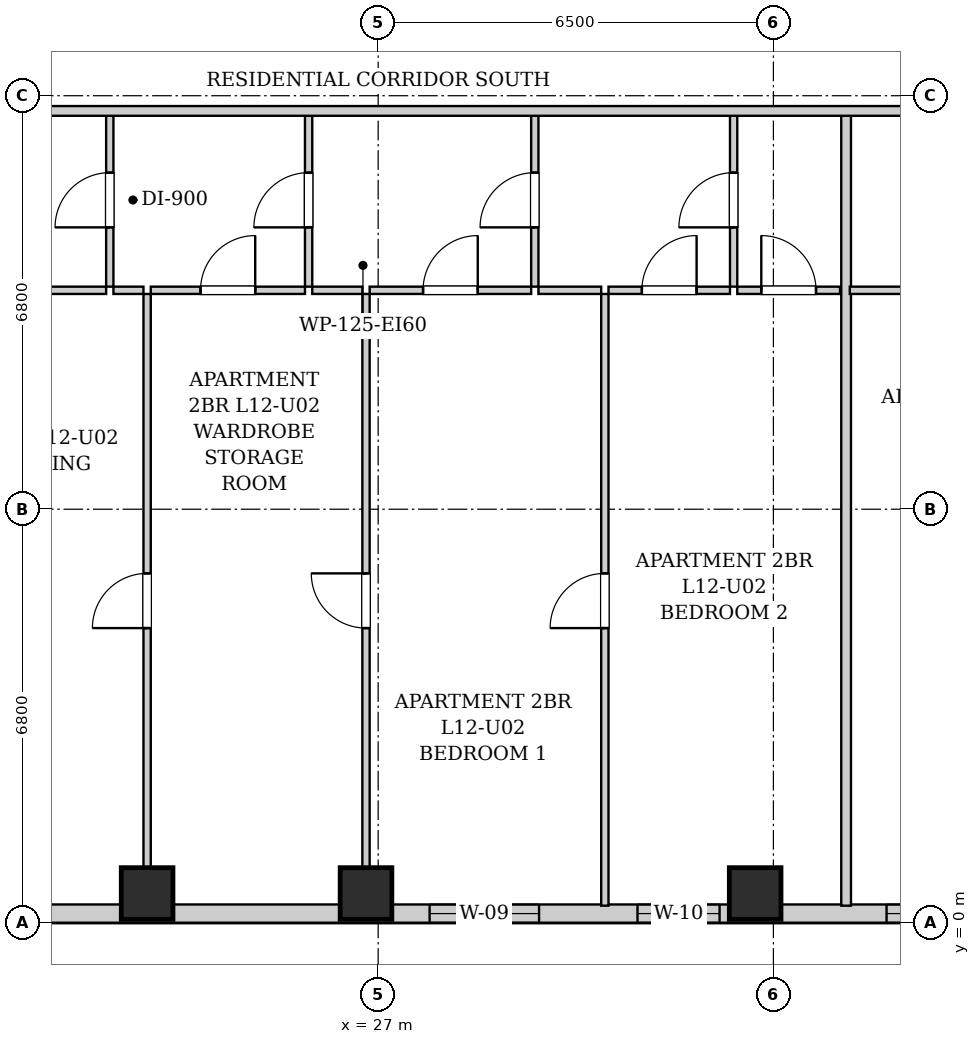
"""IFC4 building model, lengths in metres.
Left out: names, types, materials, properties, quantities, classifications, styles, units other than length and angle.
Written with IfcOpenShell. Run it as: python <this file> out.ifc"""

import sys

from ifc_helpers import new_model, si_unit, direction, frame, frame_2d, origin, origin_2d, place, context, subcontext, project, spatial, rectangle, extrude, element, fill, save


model = new_model("IFC4")
c1 = context("Model", 3, precision=1e-05, world=origin(), true_north=direction((0.0, 1.0)))
c2 = subcontext(c1, "Body", "Model", "MODEL_VIEW")
j1 = project(units=[si_unit("LENGTHUNIT", "METRE"), si_unit("PLANEANGLEUNIT", "RADIAN")], contexts=[c1])
p1 = place(None, origin())
s1 = spatial("IfcSite", under=j1, at=p1, CompositionType="ELEMENT")
p2 = place(p1, origin())
s2 = spatial("IfcBuilding", under=s1, at=p2, CompositionType="ELEMENT")
p3 = place(p2, frame((0.0, 0.0, 48.2)))
s3 = spatial("IfcBuildingStorey", under=s2, at=p3, CompositionType="ELEMENT", Elevation=48.2)
for number, where, z_axis, x_axis in (
    (1, (23.2, 0.48, 0.0), (0.0, 0.0, 1.0), (1.0, 0.0, 0.0)),
    (2, (26.8, 0.48, 0.0), (0.0, 0.0, 1.0), (1.0, 0.0, 0.0)),
    (3, (33.2, 0.48, 0.0), (0.0, 0.0, 1.0), (1.0, 0.0, 0.0)),
):
    element("IfcColumn", number, at=place(p3, frame(where, z_axis=z_axis, x_axis=x_axis)), inside=s3, PredefinedType="COLUMN", context=c2, shape_type="SweptSolid", body=[
        extrude(rectangle(XDim=0.85, YDim=0.85, at=origin_2d()), origin(), (0.0, 0.0, 1.0), 3.2),
    ])
p4 = place(p3, frame((44.0, 0.15, 0.0), z_axis=(0.0, 0.0, 1.0), x_axis=(-1.0, 0.0, 0.0)))
e4 = element("IfcWall", 4, at=p4, inside=s3, PredefinedType="SOLIDWALL", context=c2, shape_type="SweptSolid", body=[
    extrude(rectangle(XDim=26.15, YDim=0.3, at=frame_2d((13.075, 0.0))), origin(), (0.0, 0.0, 1.0), 1.975),
])
p5 = place(p4, frame((22.47, 0.0, 0.55)))
e5 = element("IfcOpeningElement", 5, at=p5, cuts=e4, PredefinedType="OPENING", context=c2, shape_type="SweptSolid", body=[
    extrude(rectangle(XDim=1.8, YDim=1.2, at=frame_2d((0.9, 0.6))), frame((0.0, 0.16, 0.0), z_axis=(0.0, -1.0, 0.0), x_axis=(1.0, 0.0, 0.0)), (0.0, 0.0, 1.0), 0.32),
])
p6 = place(p4, frame((14.354, 0.0, 0.55)))
e6 = element("IfcOpeningElement", 6, at=p6, cuts=e4, PredefinedType="OPENING", context=c2, shape_type="SweptSolid", body=[
    extrude(rectangle(XDim=1.8, YDim=1.2, at=frame_2d((0.9, 0.6))), frame((0.0, 0.16, 0.0), z_axis=(0.0, -1.0, 0.0), x_axis=(1.0, 0.0, 0.0)), (0.0, 0.0, 1.0), 0.32),
])
p7 = place(p4, frame((11.385, 0.0, 0.55)))
e7 = element("IfcOpeningElement", 7, at=p7, cuts=e4, PredefinedType="OPENING", context=c2, shape_type="SweptSolid", body=[
    extrude(rectangle(XDim=1.35, YDim=1.2, at=frame_2d((0.675, 0.6))), frame((0.0, 0.16, 0.0), z_axis=(0.0, -1.0, 0.0), x_axis=(1.0, 0.0, 0.0)), (0.0, 0.0, 1.0), 0.32),
])
p8 = place(p4, frame((6.839, 0.0, 0.55)))
e8 = element("IfcOpeningElement", 8, at=p8, cuts=e4, PredefinedType="OPENING", context=c2, shape_type="SweptSolid", body=[
    extrude(rectangle(XDim=1.8, YDim=1.2, at=frame_2d((0.9, 0.6))), frame((0.0, 0.16, 0.0), z_axis=(0.0, -1.0, 0.0), x_axis=(1.0, 0.0, 0.0)), (0.0, 0.0, 1.0), 0.32),
])
p9 = place(p4, frame((2.332, 0.0, 0.55)))
e9 = element("IfcOpeningElement", 9, at=p9, cuts=e4, PredefinedType="OPENING", context=c2, shape_type="SweptSolid", body=[
    extrude(rectangle(XDim=1.8, YDim=1.2, at=frame_2d((0.9, 0.6))), frame((0.0, 0.16, 0.0), z_axis=(0.0, -1.0, 0.0), x_axis=(1.0, 0.0, 0.0)), (0.0, 0.0, 1.0), 0.32),
])
p10 = place(p3, frame((22.586, 10.46, 0.0), z_axis=(0.0, 0.0, 1.0), x_axis=(0.0, 1.0, 0.0)))
e10 = element("IfcWall", 10, at=p10, inside=s3, PredefinedType="PARTITIONING", context=c2, shape_type="SweptSolid", body=[
    extrude(rectangle(XDim=2.85, YDim=0.12, at=frame_2d((1.425, 0.0))), origin(), (0.0, 0.0, 1.0), 2.94),
])
p11 = place(p10, frame((0.975, 0.0, 0.0)))
e11 = element("IfcOpeningElement", 11, at=p11, cuts=e10, PredefinedType="OPENING", context=c2, shape_type="SweptSolid", body=[
    extrude(rectangle(XDim=0.9, YDim=2.05, at=frame_2d((0.45, 1.025))), frame((0.0, 0.07, 0.0), z_axis=(0.0, -1.0, 0.0), x_axis=(1.0, 0.0, 0.0)), (0.0, 0.0, 1.0), 0.14),
])
p12 = place(p3, frame((18.086, 10.4, 0.0), z_axis=(0.0, 0.0, 1.0), x_axis=(1.0, 0.0, 0.0)))
e12 = element("IfcWall", 12, at=p12, inside=s3, PredefinedType="PARTITIONING", context=c2, shape_type="SweptSolid", body=[
    extrude(rectangle(XDim=4.44, YDim=0.12, at=frame_2d((2.22, 0.0))), origin(), (0.0, 0.0, 1.0), 2.94),
])
p13 = place(p12, frame((1.77, 0.0, 0.0)))
e13 = element("IfcOpeningElement", 13, at=p13, cuts=e12, PredefinedType="OPENING", context=c2, shape_type="SweptSolid", body=[
    extrude(rectangle(XDim=0.9, YDim=2.05, at=frame_2d((0.45, 1.025))), frame((0.0, 0.07, 0.0), z_axis=(0.0, -1.0, 0.0), x_axis=(1.0, 0.0, 0.0)), (0.0, 0.0, 1.0), 0.14),
])
p14 = place(p3, frame((25.856, 10.46, 0.0), z_axis=(0.0, 0.0, 1.0), x_axis=(0.0, 1.0, 0.0)))
e14 = element("IfcWall", 14, at=p14, inside=s3, PredefinedType="PARTITIONING", context=c2, shape_type="SweptSolid", body=[
    extrude(rectangle(XDim=2.85, YDim=0.12, at=frame_2d((1.425, 0.0))), origin(), (0.0, 0.0, 1.0), 2.94),
])
p15 = place(p14, frame((0.975, 0.0, 0.0)))
e15 = element("IfcOpeningElement", 15, at=p15, cuts=e14, PredefinedType="OPENING", context=c2, shape_type="SweptSolid", body=[
    extrude(rectangle(XDim=0.9, YDim=2.05, at=frame_2d((0.45, 1.025))), frame((0.0, 0.07, 0.0), z_axis=(0.0, -1.0, 0.0), x_axis=(1.0, 0.0, 0.0)), (0.0, 0.0, 1.0), 0.14),
])
p16 = place(p3, frame((22.646, 10.4, 0.0), z_axis=(0.0, 0.0, 1.0), x_axis=(1.0, 0.0, 0.0)))
e16 = element("IfcWall", 16, at=p16, inside=s3, PredefinedType="PARTITIONING", context=c2, shape_type="SweptSolid", body=[
    extrude(rectangle(XDim=0.494, YDim=0.12, at=frame_2d((0.247, 0.0))), origin(), (0.0, 0.0, 1.0), 2.94),
])
p17 = place(p3, frame((23.26, 10.4, 0.0), z_axis=(0.0, 0.0, 1.0), x_axis=(1.0, 0.0, 0.0)))
e17 = element("IfcWall", 17, at=p17, inside=s3, PredefinedType="PARTITIONING", context=c2, shape_type="SweptSolid", body=[
    extrude(rectangle(XDim=2.536, YDim=0.12, at=frame_2d((1.268, 0.0))), origin(), (0.0, 0.0, 1.0), 2.94),
])
p18 = place(p17, frame((0.818, 0.0, 0.0)))
e18 = element("IfcOpeningElement", 18, at=p18, cuts=e17, PredefinedType="OPENING", context=c2, shape_type="SweptSolid", body=[
    extrude(rectangle(XDim=0.9, YDim=2.05, at=frame_2d((0.45, 1.025))), frame((0.0, 0.07, 0.0), z_axis=(0.0, -1.0, 0.0), x_axis=(1.0, 0.0, 0.0)), (0.0, 0.0, 1.0), 0.14),
])
p19 = place(p3, frame((29.576, 10.46, 0.0), z_axis=(0.0, 0.0, 1.0), x_axis=(0.0, 1.0, 0.0)))
e19 = element("IfcWall", 19, at=p19, inside=s3, PredefinedType="PARTITIONING", context=c2, shape_type="SweptSolid", body=[
    extrude(rectangle(XDim=2.85, YDim=0.12, at=frame_2d((1.425, 0.0))), origin(), (0.0, 0.0, 1.0), 2.94),
])
p20 = place(p19, frame((0.975, 0.0, 0.0)))
e20 = element("IfcOpeningElement", 20, at=p20, cuts=e19, PredefinedType="OPENING", context=c2, shape_type="SweptSolid", body=[
    extrude(rectangle(XDim=0.9, YDim=2.05, at=frame_2d((0.45, 1.025))), frame((0.0, 0.07, 0.0), z_axis=(0.0, -1.0, 0.0), x_axis=(1.0, 0.0, 0.0)), (0.0, 0.0, 1.0), 0.14),
])
p21 = place(p3, frame((25.916, 10.4, 0.0), z_axis=(0.0, 0.0, 1.0), x_axis=(1.0, 0.0, 0.0)))
e21 = element("IfcWall", 21, at=p21, inside=s3, PredefinedType="PARTITIONING", context=c2, shape_type="SweptSolid", body=[
    extrude(rectangle(XDim=0.824, YDim=0.12, at=frame_2d((0.412, 0.0))), origin(), (0.0, 0.0, 1.0), 2.94),
])
p22 = place(p3, frame((26.86, 10.4, 0.0), z_axis=(0.0, 0.0, 1.0), x_axis=(1.0, 0.0, 0.0)))
e22 = element("IfcWall", 22, at=p22, inside=s3, PredefinedType="PARTITIONING", context=c2, shape_type="SweptSolid", body=[
    extrude(rectangle(XDim=2.656, YDim=0.12, at=frame_2d((1.328, 0.0))), origin(), (0.0, 0.0, 1.0), 2.94),
])
p23 = place(p22, frame((0.878, 0.0, 0.0)))
e23 = element("IfcOpeningElement", 23, at=p23, cuts=e22, PredefinedType="OPENING", context=c2, shape_type="SweptSolid", body=[
    extrude(rectangle(XDim=0.9, YDim=2.05, at=frame_2d((0.45, 1.025))), frame((0.0, 0.07, 0.0), z_axis=(0.0, -1.0, 0.0), x_axis=(1.0, 0.0, 0.0)), (0.0, 0.0, 1.0), 0.14),
])
p24 = place(p3, frame((32.846, 10.46, 0.0), z_axis=(0.0, 0.0, 1.0), x_axis=(0.0, 1.0, 0.0)))
e24 = element("IfcWall", 24, at=p24, inside=s3, PredefinedType="PARTITIONING", context=c2, shape_type="SweptSolid", body=[
    extrude(rectangle(XDim=2.85, YDim=0.12, at=frame_2d((1.425, 0.0))), origin(), (0.0, 0.0, 1.0), 2.94),
])
p25 = place(p24, frame((0.975, 0.0, 0.0)))
e25 = element("IfcOpeningElement", 25, at=p25, cuts=e24, PredefinedType="OPENING", context=c2, shape_type="SweptSolid", body=[
    extrude(rectangle(XDim=0.9, YDim=2.05, at=frame_2d((0.45, 1.025))), frame((0.0, 0.07, 0.0), z_axis=(0.0, -1.0, 0.0), x_axis=(1.0, 0.0, 0.0)), (0.0, 0.0, 1.0), 0.14),
])
p26 = place(p3, frame((29.636, 10.4, 0.0), z_axis=(0.0, 0.0, 1.0), x_axis=(1.0, 0.0, 0.0)))
e26 = element("IfcWall", 26, at=p26, inside=s3, PredefinedType="PARTITIONING", context=c2, shape_type="SweptSolid", body=[
    extrude(rectangle(XDim=1.032, YDim=0.12, at=frame_2d((0.516, 0.0))), origin(), (0.0, 0.0, 1.0), 2.94),
])
p27 = place(p3, frame((30.788, 10.4, 0.0), z_axis=(0.0, 0.0, 1.0), x_axis=(1.0, 0.0, 0.0)))
e27 = element("IfcWall", 27, at=p27, inside=s3, PredefinedType="PARTITIONING", context=c2, shape_type="SweptSolid", body=[
    extrude(rectangle(XDim=1.998, YDim=0.12, at=frame_2d((0.999, 0.0))), origin(), (0.0, 0.0, 1.0), 2.94),
])
p28 = place(p27, frame((0.549, 0.0, 0.0)))
e28 = element("IfcOpeningElement", 28, at=p28, cuts=e27, PredefinedType="OPENING", context=c2, shape_type="SweptSolid", body=[
    extrude(rectangle(XDim=0.9, YDim=2.05, at=frame_2d((0.45, 1.025))), frame((0.0, 0.07, 0.0), z_axis=(0.0, -1.0, 0.0), x_axis=(1.0, 0.0, 0.0)), (0.0, 0.0, 1.0), 0.14),
])
p29 = place(p3, frame((32.906, 10.4, 0.0), z_axis=(0.0, 0.0, 1.0), x_axis=(1.0, 0.0, 0.0)))
e29 = element("IfcWall", 29, at=p29, inside=s3, PredefinedType="PARTITIONING", context=c2, shape_type="SweptSolid", body=[
    extrude(rectangle(XDim=1.69, YDim=0.12, at=frame_2d((0.845, 0.0))), origin(), (0.0, 0.0, 1.0), 2.94),
])
p30 = place(p29, frame((0.395, 0.0, 0.0)))
e30 = element("IfcOpeningElement", 30, at=p30, cuts=e29, PredefinedType="OPENING", context=c2, shape_type="SweptSolid", body=[
    extrude(rectangle(XDim=0.9, YDim=2.05, at=frame_2d((0.45, 1.025))), frame((0.0, 0.07, 0.0), z_axis=(0.0, -1.0, 0.0), x_axis=(1.0, 0.0, 0.0)), (0.0, 0.0, 1.0), 0.14),
])
p31 = place(p3, frame((23.2, 0.28, 0.0), z_axis=(0.0, 0.0, 1.0), x_axis=(0.0, 1.0, 0.0)))
e31 = element("IfcWall", 31, at=p31, inside=s3, PredefinedType="PARTITIONING", context=c2, shape_type="SweptSolid", body=[
    extrude(rectangle(XDim=10.06, YDim=0.12, at=frame_2d((5.03, 0.0))), origin(), (0.0, 0.0, 1.0), 2.94),
])
p32 = place(p31, frame((4.565, 0.0, 0.0)))
e32 = element("IfcOpeningElement", 32, at=p32, cuts=e31, PredefinedType="OPENING", context=c2, shape_type="SweptSolid", body=[
    extrude(rectangle(XDim=0.9, YDim=2.05, at=frame_2d((0.45, 1.025))), frame((0.0, 0.07, 0.0), z_axis=(0.0, -1.0, 0.0), x_axis=(1.0, 0.0, 0.0)), (0.0, 0.0, 1.0), 0.14),
])
p33 = place(p3, frame((26.8, 0.28, 0.0), z_axis=(0.0, 0.0, 1.0), x_axis=(0.0, 1.0, 0.0)))
e33 = element("IfcWall", 33, at=p33, inside=s3, PredefinedType="PARTITIONING", context=c2, shape_type="SweptSolid", body=[
    extrude(rectangle(XDim=10.06, YDim=0.12, at=frame_2d((5.03, 0.0))), origin(), (0.0, 0.0, 1.0), 2.94),
])
p34 = place(p33, frame((4.565, 0.0, 0.0)))
e34 = element("IfcOpeningElement", 34, at=p34, cuts=e33, PredefinedType="OPENING", context=c2, shape_type="SweptSolid", body=[
    extrude(rectangle(XDim=0.9, YDim=2.05, at=frame_2d((0.45, 1.025))), frame((0.0, 0.07, 0.0), z_axis=(0.0, -1.0, 0.0), x_axis=(1.0, 0.0, 0.0)), (0.0, 0.0, 1.0), 0.14),
])
p35 = place(p3, frame((30.728, 0.28, 0.0), z_axis=(0.0, 0.0, 1.0), x_axis=(0.0, 1.0, 0.0)))
e35 = element("IfcWall", 35, at=p35, inside=s3, PredefinedType="PARTITIONING", context=c2, shape_type="SweptSolid", body=[
    extrude(rectangle(XDim=10.06, YDim=0.12, at=frame_2d((5.03, 0.0))), origin(), (0.0, 0.0, 1.0), 2.94),
])
p36 = place(p35, frame((4.565, 0.0, 0.0)))
e36 = element("IfcOpeningElement", 36, at=p36, cuts=e35, PredefinedType="OPENING", context=c2, shape_type="SweptSolid", body=[
    extrude(rectangle(XDim=0.9, YDim=2.05, at=frame_2d((0.45, 1.025))), frame((0.0, 0.07, 0.0), z_axis=(0.0, -1.0, 0.0), x_axis=(1.0, 0.0, 0.0)), (0.0, 0.0, 1.0), 0.14),
])
p37 = place(p3, frame((34.696, 0.28, 0.0), z_axis=(0.0, 0.0, 1.0), x_axis=(0.0, 1.0, 0.0)))
e37 = element("IfcWall", 37, at=p37, inside=s3, PredefinedType="PARTITIONING", context=c2, shape_type="SweptSolid", body=[
    extrude(rectangle(XDim=13.03, YDim=0.16, at=frame_2d((6.515, 0.0))), origin(), (0.0, 0.0, 1.0), 2.94),
])
p38 = place(p3, frame((34.756, 10.4, 0.0), z_axis=(0.0, 0.0, 1.0), x_axis=(1.0, 0.0, 0.0)))
e38 = element("IfcWall", 38, at=p38, inside=s3, PredefinedType="PARTITIONING", context=c2, shape_type="SweptSolid", body=[
    extrude(rectangle(XDim=2.4, YDim=0.12, at=frame_2d((1.2, 0.0))), origin(), (0.0, 0.0, 1.0), 2.94),
])
p39 = place(p3, frame((10.05, 13.35, 0.0), z_axis=(0.0, 0.0, 1.0), x_axis=(1.0, 0.0, 0.0)))
e39 = element("IfcWall", 39, at=p39, inside=s3, PredefinedType="PARTITIONING", context=c2, shape_type="SweptSolid", body=[
    extrude(rectangle(XDim=33.9, YDim=0.16, at=frame_2d((16.95, 0.0))), origin(), (0.0, 0.0, 1.0), 2.94),
])
p40 = place(p39, frame((3.203, 0.0, 0.0)))
e40 = element("IfcOpeningElement", 40, at=p40, cuts=e39, PredefinedType="OPENING", context=c2, shape_type="SweptSolid", body=[
    extrude(rectangle(XDim=0.95, YDim=2.1, at=frame_2d((0.475, 1.05))), frame((0.0, 0.09, 0.0), z_axis=(0.0, -1.0, 0.0), x_axis=(1.0, 0.0, 0.0)), (0.0, 0.0, 1.0), 0.18),
])
p41 = place(p39, frame((9.39, 0.0, 0.0)))
e41 = element("IfcOpeningElement", 41, at=p41, cuts=e39, PredefinedType="OPENING", context=c2, shape_type="SweptSolid", body=[
    extrude(rectangle(XDim=0.95, YDim=2.1, at=frame_2d((0.475, 1.05))), frame((0.0, 0.09, 0.0), z_axis=(0.0, -1.0, 0.0), x_axis=(1.0, 0.0, 0.0)), (0.0, 0.0, 1.0), 0.18),
])
p42 = place(p39, frame((28.476, 0.0, 0.0)))
e42 = element("IfcOpeningElement", 42, at=p42, cuts=e39, PredefinedType="OPENING", context=c2, shape_type="SweptSolid", body=[
    extrude(rectangle(XDim=0.95, YDim=2.1, at=frame_2d((0.475, 1.05))), frame((0.0, 0.09, 0.0), z_axis=(0.0, -1.0, 0.0), x_axis=(1.0, 0.0, 0.0)), (0.0, 0.0, 1.0), 0.18),
])
p43 = place(p11, origin())
e43 = element("IfcDoor", 43, at=p43, inside=s3, OperationType="SINGLE_SWING_LEFT", PredefinedType="DOOR", context=c2, shape_type="SweptSolid", body=[
    extrude(rectangle(XDim=0.9, YDim=2.05, at=frame_2d((0.45, 1.025))), frame((0.0, 0.025, 0.0), z_axis=(0.0, -1.0, 0.0), x_axis=(1.0, 0.0, 0.0)), (0.0, 0.0, 1.0), 0.05),
])
fill(e11, e43)
p44 = place(p15, origin())
e44 = element("IfcDoor", 44, at=p44, inside=s3, OperationType="SINGLE_SWING_LEFT", PredefinedType="DOOR", context=c2, shape_type="SweptSolid", body=[
    extrude(rectangle(XDim=0.9, YDim=2.05, at=frame_2d((0.45, 1.025))), frame((0.0, 0.025, 0.0), z_axis=(0.0, -1.0, 0.0), x_axis=(1.0, 0.0, 0.0)), (0.0, 0.0, 1.0), 0.05),
])
fill(e15, e44)
p45 = place(p18, origin())
e45 = element("IfcDoor", 45, at=p45, inside=s3, OperationType="SINGLE_SWING_RIGHT", PredefinedType="DOOR", context=c2, shape_type="SweptSolid", body=[
    extrude(rectangle(XDim=0.9, YDim=2.05, at=frame_2d((0.45, 1.025))), frame((0.0, 0.025, 0.0), z_axis=(0.0, -1.0, 0.0), x_axis=(1.0, 0.0, 0.0)), (0.0, 0.0, 1.0), 0.05),
])
fill(e18, e45)
p46 = place(p20, origin())
e46 = element("IfcDoor", 46, at=p46, inside=s3, OperationType="SINGLE_SWING_LEFT", PredefinedType="DOOR", context=c2, shape_type="SweptSolid", body=[
    extrude(rectangle(XDim=0.9, YDim=2.05, at=frame_2d((0.45, 1.025))), frame((0.0, 0.025, 0.0), z_axis=(0.0, -1.0, 0.0), x_axis=(1.0, 0.0, 0.0)), (0.0, 0.0, 1.0), 0.05),
])
fill(e20, e46)
p47 = place(p23, origin())
e47 = element("IfcDoor", 47, at=p47, inside=s3, OperationType="SINGLE_SWING_RIGHT", PredefinedType="DOOR", context=c2, shape_type="SweptSolid", body=[
    extrude(rectangle(XDim=0.9, YDim=2.05, at=frame_2d((0.45, 1.025))), frame((0.0, 0.025, 0.0), z_axis=(0.0, -1.0, 0.0), x_axis=(1.0, 0.0, 0.0)), (0.0, 0.0, 1.0), 0.05),
])
fill(e23, e47)
p48 = place(p25, origin())
e48 = element("IfcDoor", 48, at=p48, inside=s3, OperationType="SINGLE_SWING_LEFT", PredefinedType="DOOR", context=c2, shape_type="SweptSolid", body=[
    extrude(rectangle(XDim=0.9, YDim=2.05, at=frame_2d((0.45, 1.025))), frame((0.0, 0.025, 0.0), z_axis=(0.0, -1.0, 0.0), x_axis=(1.0, 0.0, 0.0)), (0.0, 0.0, 1.0), 0.05),
])
fill(e25, e48)
p49 = place(p28, origin())
e49 = element("IfcDoor", 49, at=p49, inside=s3, OperationType="SINGLE_SWING_RIGHT", PredefinedType="DOOR", context=c2, shape_type="SweptSolid", body=[
    extrude(rectangle(XDim=0.9, YDim=2.05, at=frame_2d((0.45, 1.025))), frame((0.0, 0.025, 0.0), z_axis=(0.0, -1.0, 0.0), x_axis=(1.0, 0.0, 0.0)), (0.0, 0.0, 1.0), 0.05),
])
fill(e28, e49)
p50 = place(p30, origin())
e50 = element("IfcDoor", 50, at=p50, inside=s3, OperationType="SINGLE_SWING_LEFT", PredefinedType="DOOR", context=c2, shape_type="SweptSolid", body=[
    extrude(rectangle(XDim=0.9, YDim=2.05, at=frame_2d((0.45, 1.025))), frame((0.0, 0.025, 0.0), z_axis=(0.0, -1.0, 0.0), x_axis=(1.0, 0.0, 0.0)), (0.0, 0.0, 1.0), 0.05),
])
fill(e30, e50)
p51 = place(p32, origin())
e51 = element("IfcDoor", 51, at=p51, inside=s3, OperationType="SINGLE_SWING_LEFT", PredefinedType="DOOR", context=c2, shape_type="SweptSolid", body=[
    extrude(rectangle(XDim=0.9, YDim=2.05, at=frame_2d((0.45, 1.025))), frame((0.0, 0.025, 0.0), z_axis=(0.0, -1.0, 0.0), x_axis=(1.0, 0.0, 0.0)), (0.0, 0.0, 1.0), 0.05),
])
fill(e32, e51)
p52 = place(p34, origin())
e52 = element("IfcDoor", 52, at=p52, inside=s3, OperationType="SINGLE_SWING_RIGHT", PredefinedType="DOOR", context=c2, shape_type="SweptSolid", body=[
    extrude(rectangle(XDim=0.9, YDim=2.05, at=frame_2d((0.45, 1.025))), frame((0.0, 0.025, 0.0), z_axis=(0.0, -1.0, 0.0), x_axis=(1.0, 0.0, 0.0)), (0.0, 0.0, 1.0), 0.05),
])
fill(e34, e52)
p53 = place(p36, origin())
e53 = element("IfcDoor", 53, at=p53, inside=s3, OperationType="SINGLE_SWING_LEFT", PredefinedType="DOOR", context=c2, shape_type="SweptSolid", body=[
    extrude(rectangle(XDim=0.9, YDim=2.05, at=frame_2d((0.45, 1.025))), frame((0.0, 0.025, 0.0), z_axis=(0.0, -1.0, 0.0), x_axis=(1.0, 0.0, 0.0)), (0.0, 0.0, 1.0), 0.05),
])
fill(e36, e53)
p54 = place(p6, origin())
e54 = element("IfcWindow", 54, at=p54, inside=s3, PartitioningType="DOUBLE_PANEL_VERTICAL", PredefinedType="WINDOW", context=c2, shape_type="SweptSolid", body=[
    extrude(rectangle(XDim=1.8, YDim=1.2, at=frame_2d((0.9, 0.6))), frame((0.0, 0.03, 0.0), z_axis=(0.0, -1.0, 0.0), x_axis=(1.0, 0.0, 0.0)), (0.0, 0.0, 1.0), 0.06),
])
fill(e6, e54)
p55 = place(p7, origin())
e55 = element("IfcWindow", 55, at=p55, inside=s3, PartitioningType="SINGLE_PANEL", PredefinedType="WINDOW", context=c2, shape_type="SweptSolid", body=[
    extrude(rectangle(XDim=1.35, YDim=1.2, at=frame_2d((0.675, 0.6))), frame((0.0, 0.03, 0.0), z_axis=(0.0, -1.0, 0.0), x_axis=(1.0, 0.0, 0.0)), (0.0, 0.0, 1.0), 0.06),
])
fill(e7, e55)
p56 = place(p8, origin())
e56 = element("IfcWindow", 56, at=p56, inside=s3, PartitioningType="DOUBLE_PANEL_VERTICAL", PredefinedType="WINDOW", context=c2, shape_type="SweptSolid", body=[
    extrude(rectangle(XDim=1.8, YDim=1.2, at=frame_2d((0.9, 0.6))), frame((0.0, 0.03, 0.0), z_axis=(0.0, -1.0, 0.0), x_axis=(1.0, 0.0, 0.0)), (0.0, 0.0, 1.0), 0.06),
])
fill(e8, e56)
save(model, sys.argv[1])
